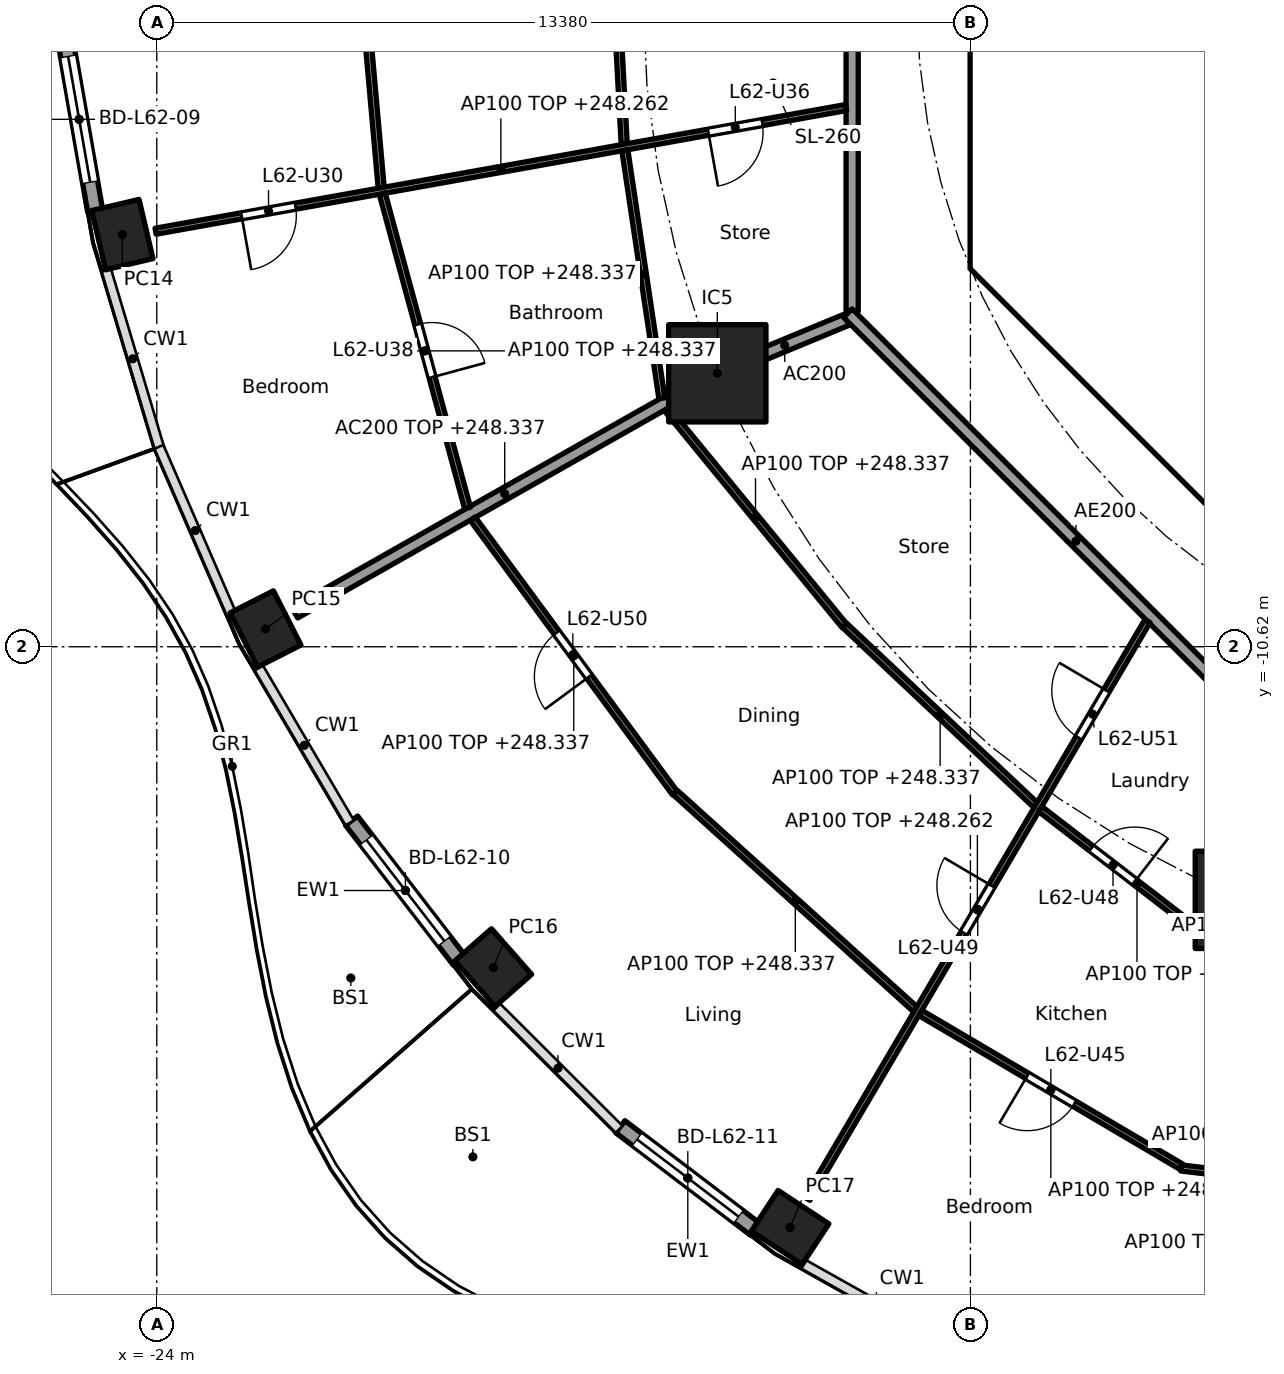
"""IFC4 building model, lengths in metres.
Left out: names, types, materials, properties, quantities, classifications, styles, units other than length and angle.
Written with IfcOpenShell. Run it as: python <this file> out.ifc"""

import sys

from ifc_helpers import new_model, si_unit, direction, frame, frame_2d, origin, origin_2d, place, context, subcontext, project, spatial, polyline, rectangle, hollow_rectangle, outline, extrude, element, fill, save


model = new_model("IFC4")
c1 = context("Model", 3, precision=1e-05, world=origin(), true_north=direction((0.0, 1.0)))
c2 = subcontext(c1, "Body", "Model", "MODEL_VIEW")
j1 = project(units=[si_unit("LENGTHUNIT", "METRE"), si_unit("PLANEANGLEUNIT", "RADIAN")], contexts=[c1])
p1 = place(None, origin())
s1 = spatial("IfcSite", under=j1, at=p1, CompositionType="ELEMENT")
p2 = place(p1, origin())
s2 = spatial("IfcBuilding", under=s1, at=p2, CompositionType="ELEMENT")
p3 = place(p2, frame((0.0, 0.0, 245.5)))
s3 = spatial("IfcBuildingStorey", under=s2, at=p3, CompositionType="ELEMENT", Elevation=245.5)
for number, where, z_axis, x_axis in (
    (1, (-24.567, -3.842, 0.0), (0.0, 0.0, 1.0), (0.229, -0.973, 0.0)),
    (2, (-22.212, -10.327, 0.0), (0.0, 0.0, 1.0), (0.452, -0.892, 0.0)),
    (3, (-18.467, -15.896, 0.0), (0.0, 0.0, 1.0), (0.66, -0.751, 0.0)),
    (4, (-13.585, -20.17, 0.0), (0.0, 0.0, 1.0), (0.836, -0.549, 0.0)),
):
    element("IfcColumn", number, at=place(p3, frame(where, z_axis=z_axis, x_axis=x_axis)), inside=s3, PredefinedType="COLUMN", context=c2, shape_type="SweptSolid", body=[
        extrude(hollow_rectangle(XDim=1.0, YDim=0.8, WallThickness=0.032, at=origin_2d()), origin(), (0.0, 0.0, 1.0), 3.7),
    ])
for number, where, z_axis, x_axis in (
    (5, (-14.782, -6.123, 0.0), (0.0, 0.0, 1.0), (1.0, 0.0, 0.0)),
    (6, (-6.123, -14.782, 0.0), (0.0, 0.0, 1.0), (1.0, 0.0, 0.0)),
):
    element("IfcColumn", number, at=place(p3, frame(where, z_axis=z_axis, x_axis=x_axis)), inside=s3, PredefinedType="COLUMN", context=c2, shape_type="SweptSolid", body=[
        extrude(rectangle(XDim=1.6, YDim=1.6, at=origin_2d()), origin(), (0.0, 0.0, 1.0), 3.7),
    ])
p4 = place(p3, frame((-25.013, -3.457, 0.0), z_axis=(0.0, 0.0, 1.0), x_axis=(-0.172241318156, 0.985054784426, 0.0)))
e7 = element("IfcWall", 7, at=p4, inside=s3, PredefinedType="SOLIDWALL", context=c2, shape_type="SweptSolid", body=[
    extrude(rectangle(XDim=3.067, YDim=0.25, at=frame_2d((1.534, 0.0))), origin(), (0.0, 0.0, 1.0), 3.44),
])
p5 = place(p4, frame((0.484, 0.0, 0.0)))
e8 = element("IfcOpeningElement", 8, at=p5, cuts=e7, PredefinedType="OPENING", context=c2, shape_type="SweptSolid", body=[
    extrude(rectangle(XDim=2.1, YDim=2.4, at=frame_2d((1.05, 1.2))), frame((0.0, 0.135, 0.0), z_axis=(0.0, -1.0, 0.0), x_axis=(1.0, 0.0, 0.0)), (0.0, 0.0, 1.0), 0.27),
])
p6 = place(p3, frame((-19.026, -15.778, 0.0), z_axis=(0.0, 0.0, 1.0), x_axis=(-0.610438565676, 0.792063607001, 0.0)))
e9 = element("IfcWall", 9, at=p6, inside=s3, PredefinedType="SOLIDWALL", context=c2, shape_type="SweptSolid", body=[
    extrude(rectangle(XDim=2.901, YDim=0.25, at=frame_2d((1.45, 0.0))), origin(), (0.0, 0.0, 1.0), 3.44),
])
p7 = place(p6, frame((0.4, 0.0, 0.0)))
e10 = element("IfcOpeningElement", 10, at=p7, cuts=e9, PredefinedType="OPENING", context=c2, shape_type="SweptSolid", body=[
    extrude(rectangle(XDim=2.1, YDim=2.4, at=frame_2d((1.05, 1.2))), frame((0.0, 0.135, 0.0), z_axis=(0.0, -1.0, 0.0), x_axis=(1.0, 0.0, 0.0)), (0.0, 0.0, 1.0), 0.27),
])
p8 = place(p3, frame((-14.157, -20.201, 0.0), z_axis=(0.0, 0.0, 1.0), x_axis=(-0.795990084031, 0.60530966135, 0.0)))
e11 = element("IfcWall", 11, at=p8, inside=s3, PredefinedType="SOLIDWALL", context=c2, shape_type="SweptSolid", body=[
    extrude(rectangle(XDim=2.789, YDim=0.25, at=frame_2d((1.394, 0.0))), origin(), (0.0, 0.0, 1.0), 3.44),
])
p9 = place(p8, frame((0.344, 0.0, 0.0)))
e12 = element("IfcOpeningElement", 12, at=p9, cuts=e11, PredefinedType="OPENING", context=c2, shape_type="SweptSolid", body=[
    extrude(rectangle(XDim=2.1, YDim=2.4, at=frame_2d((1.05, 1.2))), frame((0.0, 0.135, 0.0), z_axis=(0.0, -1.0, 0.0), x_axis=(1.0, 0.0, 0.0)), (0.0, 0.0, 1.0), 0.27),
])
p10 = place(p3, frame((-10.325, 3.801, 0.0), z_axis=(0.0, 0.0, 1.0), x_axis=(0.0, -1.0, 0.0)))
e13 = element("IfcWall", 13, at=p10, inside=s3, PredefinedType="SHEAR", context=c2, shape_type="SweptSolid", body=[
    extrude(rectangle(XDim=7.602, YDim=0.6, at=frame_2d((3.801, 0.0))), origin(), (0.0, 0.0, 1.0), 3.44),
])
p11 = place(p10, frame((0.651, 0.0, 0.0)))
e14 = element("IfcOpeningElement", 14, at=p11, cuts=e13, PredefinedType="OPENING", context=c2, shape_type="SweptSolid", body=[
    extrude(rectangle(XDim=1.5, YDim=2.1, at=frame_2d((0.75, 1.05))), frame((0.0, 0.31, 0.0), z_axis=(0.0, -1.0, 0.0), x_axis=(1.0, 0.0, 0.0)), (0.0, 0.0, 1.0), 0.62),
])
p12 = place(p10, frame((5.451, 0.0, 0.0)))
e15 = element("IfcOpeningElement", 15, at=p12, cuts=e13, PredefinedType="OPENING", context=c2, shape_type="SweptSolid", body=[
    extrude(rectangle(XDim=1.5, YDim=2.1, at=frame_2d((0.75, 1.05))), frame((0.0, 0.31, 0.0), z_axis=(0.0, -1.0, 0.0), x_axis=(1.0, 0.0, 0.0)), (0.0, 0.0, 1.0), 0.62),
])
p13 = place(p3, frame((-9.988, -4.613, 0.0), z_axis=(0.0, 0.0, 1.0), x_axis=(0.707106781187, -0.707106781187, 0.0)))
e16 = element("IfcWall", 16, at=p13, inside=s3, PredefinedType="SHEAR", context=c2, shape_type="SweptSolid", body=[
    extrude(rectangle(XDim=7.602, YDim=0.6, at=frame_2d((3.801, 0.0))), origin(), (0.0, 0.0, 1.0), 3.44),
])
p14 = place(p13, frame((6.151, 0.0, 0.0)))
e17 = element("IfcOpeningElement", 17, at=p14, cuts=e16, PredefinedType="OPENING", context=c2, shape_type="SweptSolid", body=[
    extrude(rectangle(XDim=1.1, YDim=2.1, at=frame_2d((0.55, 1.05))), frame((0.0, 0.31, 0.0), z_axis=(0.0, -1.0, 0.0), x_axis=(1.0, 0.0, 0.0)), (0.0, 0.0, 1.0), 0.62),
])
p15 = place(p3, origin())
e18 = element("IfcWall", 18, at=p15, inside=s3, PredefinedType="SHEAR", context=c2, shape_type="SweptSolid", body=[
    extrude(outline(polyline([(-10.625, -3.801), (-10.025, -3.801), (-10.025, -4.152), (-9.776, -4.401), (-10.2, -4.825), (-10.625, -4.401), (-10.625, -3.801)])), origin(), (0.0, 0.0, 1.0), 3.44),
])
p16 = place(p3, frame((-10.025, -4.0, 0.0), z_axis=(0.0, 0.0, 1.0), x_axis=(1.0, 0.0, 0.0)))
e19 = element("IfcWall", 19, at=p16, inside=s3, PredefinedType="PARTITIONING", context=c2, shape_type="SweptSolid", body=[
    extrude(rectangle(XDim=3.325, YDim=0.2, at=frame_2d((1.662, 0.0))), origin(), (0.0, 0.0, 1.0), 3.44),
])
p17 = place(p3, frame((-8.001, -6.1, 0.0), z_axis=(0.0, 0.0, 1.0), x_axis=(1.0, 0.0, 0.0)))
e20 = element("IfcWall", 20, at=p17, inside=s3, PredefinedType="PARTITIONING", context=c2, shape_type="SweptSolid", body=[
    extrude(rectangle(XDim=2.126, YDim=0.15, at=frame_2d((1.063, 0.0))), origin(), (0.0, 0.0, 1.0), 3.44),
])
p18 = place(p3, frame((-12.657, -5.243, 0.0), z_axis=(0.0, 0.0, 1.0), x_axis=(-0.923859888513, -0.38273085373, 0.0)))
e21 = element("IfcWall", 21, at=p18, inside=s3, PredefinedType="PARTITIONING", context=c2, shape_type="SweptSolid", body=[
    extrude(rectangle(XDim=2.199, YDim=0.2, at=frame_2d((1.1, 0.0))), origin(), (0.0, 0.0, 1.0), 3.44),
])
p19 = place(p3, frame((-14.825, -6.148, 0.0), z_axis=(0.0, 0.0, 1.0), x_axis=(-0.870099576105, -0.492875975944, 0.0)))
e22 = element("IfcWall", 22, at=p19, inside=s3, PredefinedType="PARTITIONING", context=c2, shape_type="SweptSolid", body=[
    extrude(rectangle(XDim=7.937, YDim=0.2, at=frame_2d((3.969, 0.0))), origin(), (0.0, 0.0, 1.0), 2.837),
])
p20 = place(p3, frame((-12.565, 5.304, 0.0), z_axis=(0.0, 0.0, 1.0), x_axis=(0.0, -1.0, 0.0)))
e23 = element("IfcWall", 23, at=p20, inside=s3, PredefinedType="PARTITIONING", context=c2, shape_type="SweptSolid", body=[
    extrude(rectangle(XDim=10.409, YDim=0.2, at=frame_2d((5.205, 0.0))), origin(), (0.0, 0.0, 1.0), 3.44),
])
p21 = place(p3, frame((-12.635, -5.134, 0.0), z_axis=(0.0, 0.0, 1.0), x_axis=(0.707106781187, -0.707106781187, 0.0)))
e24 = element("IfcWall", 24, at=p21, inside=s3, PredefinedType="PARTITIONING", context=c2, shape_type="SweptSolid", body=[
    extrude(rectangle(XDim=10.609, YDim=0.2, at=frame_2d((5.305, 0.0))), origin(), (0.0, 0.0, 1.0), 3.44),
])
p22 = place(p3, frame((-16.554, 2.1, 0.0), z_axis=(0.0, 0.0, 1.0), x_axis=(0.053945770239, -0.998543866775, 0.0)))
e25 = element("IfcWall", 25, at=p22, inside=s3, PredefinedType="PARTITIONING", context=c2, shape_type="SweptSolid", body=[
    extrude(rectangle(XDim=4.462, YDim=0.1, at=frame_2d((2.231, 0.0))), origin(), (0.0, 0.0, 1.0), 2.837),
])
p23 = place(p3, frame((-20.81, 2.542, 0.0), z_axis=(0.0, 0.0, 1.0), x_axis=(0.088621920298, -0.996065336834, 0.0)))
e26 = element("IfcWall", 26, at=p23, inside=s3, PredefinedType="PARTITIONING", context=c2, shape_type="SweptSolid", body=[
    extrude(rectangle(XDim=5.636, YDim=0.1, at=frame_2d((2.818, 0.0))), origin(), (0.0, 0.0, 1.0), 2.837),
])
p24 = place(p3, frame((-12.663, -1.752, 0.0), z_axis=(0.0, 0.0, 1.0), x_axis=(-0.98433012022, -0.176335516635, 0.0)))
e27 = element("IfcWall", 27, at=p24, inside=s3, PredefinedType="PARTITIONING", context=c2, shape_type="SweptSolid", body=[
    extrude(rectangle(XDim=11.537, YDim=0.1, at=frame_2d((5.769, 0.0))), origin(), (0.0, 0.0, 1.0), 2.762),
])
p25 = place(p24, frame((9.201, 0.0, 0.0)))
e28 = element("IfcOpeningElement", 28, at=p25, cuts=e27, PredefinedType="OPENING", context=c2, shape_type="SweptSolid", body=[
    extrude(rectangle(XDim=0.9, YDim=2.1, at=frame_2d((0.45, 1.05))), frame((0.0, 0.06, 0.0), z_axis=(0.0, -1.0, 0.0), x_axis=(1.0, 0.0, 0.0)), (0.0, 0.0, 1.0), 0.12),
])
p26 = place(p24, frame((1.403, 0.0, 0.0)))
e29 = element("IfcOpeningElement", 29, at=p26, cuts=e27, PredefinedType="OPENING", context=c2, shape_type="SweptSolid", body=[
    extrude(rectangle(XDim=0.9, YDim=2.1, at=frame_2d((0.45, 1.05))), frame((0.0, 0.06, 0.0), z_axis=(0.0, -1.0, 0.0), x_axis=(1.0, 0.0, 0.0)), (0.0, 0.0, 1.0), 0.12),
])
p27 = place(p3, frame((-16.303, -2.455, 0.0), z_axis=(0.0, 0.0, 1.0), x_axis=(0.147711951447, -0.9890304239, 0.0)))
e30 = element("IfcWall", 30, at=p27, inside=s3, PredefinedType="PARTITIONING", context=c2, shape_type="SweptSolid", body=[
    extrude(rectangle(XDim=4.122, YDim=0.1, at=frame_2d((2.061, 0.0))), origin(), (0.0, 0.0, 1.0), 2.837),
])
p28 = place(p3, frame((-20.292, -3.17, 0.0), z_axis=(0.0, 0.0, 1.0), x_axis=(0.26187906236, -0.965100697698, 0.0)))
e31 = element("IfcWall", 31, at=p28, inside=s3, PredefinedType="PARTITIONING", context=c2, shape_type="SweptSolid", body=[
    extrude(rectangle(XDim=5.356, YDim=0.1, at=frame_2d((2.678, 0.0))), origin(), (0.0, 0.0, 1.0), 2.837),
])
p29 = place(p28, frame((2.228, 0.0, 0.0)))
e32 = element("IfcOpeningElement", 32, at=p29, cuts=e31, PredefinedType="OPENING", context=c2, shape_type="SweptSolid", body=[
    extrude(rectangle(XDim=0.9, YDim=2.1, at=frame_2d((0.45, 1.05))), frame((0.0, 0.06, 0.0), z_axis=(0.0, -1.0, 0.0), x_axis=(1.0, 0.0, 0.0)), (0.0, 0.0, 1.0), 0.12),
])
p30 = place(p3, frame((-15.616, -6.708, 0.0), z_axis=(0.0, 0.0, 1.0), x_axis=(0.634076422357, -0.773270386483, 0.0)))
e33 = element("IfcWall", 33, at=p30, inside=s3, PredefinedType="PARTITIONING", context=c2, shape_type="SweptSolid", body=[
    extrude(rectangle(XDim=4.611, YDim=0.1, at=frame_2d((2.306, 0.0))), origin(), (0.0, 0.0, 1.0), 2.837),
])
p31 = place(p3, frame((-18.804, -8.516, 0.0), z_axis=(0.0, 0.0, 1.0), x_axis=(0.593249583583, -0.805018590828, 0.0)))
e34 = element("IfcWall", 34, at=p31, inside=s3, PredefinedType="PARTITIONING", context=c2, shape_type="SweptSolid", body=[
    extrude(rectangle(XDim=5.602, YDim=0.1, at=frame_2d((2.801, 0.0))), origin(), (0.0, 0.0, 1.0), 2.837),
])
p32 = place(p31, frame((2.326, 0.0, 0.0)))
e35 = element("IfcOpeningElement", 35, at=p32, cuts=e34, PredefinedType="OPENING", context=c2, shape_type="SweptSolid", body=[
    extrude(rectangle(XDim=0.9, YDim=2.1, at=frame_2d((0.45, 1.05))), frame((0.0, 0.06, 0.0), z_axis=(0.0, -1.0, 0.0), x_axis=(1.0, 0.0, 0.0)), (0.0, 0.0, 1.0), 0.12),
])
p33 = place(p3, frame((-12.688, -10.27, 0.0), z_axis=(0.0, 0.0, 1.0), x_axis=(0.728268142903, -0.685292282192, 0.0)))
e36 = element("IfcWall", 36, at=p33, inside=s3, PredefinedType="PARTITIONING", context=c2, shape_type="SweptSolid", body=[
    extrude(rectangle(XDim=4.312, YDim=0.1, at=frame_2d((2.156, 0.0))), origin(), (0.0, 0.0, 1.0), 2.837),
])
p34 = place(p3, frame((-15.474, -13.019, 0.0), z_axis=(0.0, 0.0, 1.0), x_axis=(0.742348572616, -0.670013878017, 0.0)))
e37 = element("IfcWall", 37, at=p34, inside=s3, PredefinedType="PARTITIONING", context=c2, shape_type="SweptSolid", body=[
    extrude(rectangle(XDim=5.319, YDim=0.1, at=frame_2d((2.66, 0.0))), origin(), (0.0, 0.0, 1.0), 2.837),
])
p35 = place(p3, frame((-7.709, -10.198, 0.0), z_axis=(0.0, 0.0, 1.0), x_axis=(-0.507355901053, -0.8617366127, 0.0)))
e38 = element("IfcWall", 38, at=p35, inside=s3, PredefinedType="PARTITIONING", context=c2, shape_type="SweptSolid", body=[
    extrude(rectangle(XDim=11.025, YDim=0.1, at=frame_2d((5.512, 0.0))), origin(), (0.0, 0.0, 1.0), 2.762),
])
p36 = place(p35, frame((5.05, 0.0, 0.0)))
e39 = element("IfcOpeningElement", 39, at=p36, cuts=e38, PredefinedType="OPENING", context=c2, shape_type="SweptSolid", body=[
    extrude(rectangle(XDim=0.9, YDim=2.1, at=frame_2d((0.45, 1.05))), frame((0.0, 0.06, 0.0), z_axis=(0.0, -1.0, 0.0), x_axis=(1.0, 0.0, 0.0)), (0.0, 0.0, 1.0), 0.12),
])
p37 = place(p35, frame((1.326, 0.0, 0.0)))
e40 = element("IfcOpeningElement", 40, at=p37, cuts=e38, PredefinedType="OPENING", context=c2, shape_type="SweptSolid", body=[
    extrude(rectangle(XDim=0.9, YDim=2.1, at=frame_2d((0.45, 1.05))), frame((0.0, 0.06, 0.0), z_axis=(0.0, -1.0, 0.0), x_axis=(1.0, 0.0, 0.0)), (0.0, 0.0, 1.0), 0.12),
])
p38 = place(p3, frame((-9.471, -13.289, 0.0), z_axis=(0.0, 0.0, 1.0), x_axis=(0.792207964046, -0.610251211963, 0.0)))
e41 = element("IfcWall", 41, at=p38, inside=s3, PredefinedType="PARTITIONING", context=c2, shape_type="SweptSolid", body=[
    extrude(rectangle(XDim=4.016, YDim=0.1, at=frame_2d((2.008, 0.0))), origin(), (0.0, 0.0, 1.0), 2.837),
])
p39 = place(p38, frame((1.06, 0.0, 0.0)))
e42 = element("IfcOpeningElement", 42, at=p39, cuts=e41, PredefinedType="OPENING", context=c2, shape_type="SweptSolid", body=[
    extrude(rectangle(XDim=0.9, YDim=2.1, at=frame_2d((0.45, 1.05))), frame((0.0, 0.06, 0.0), z_axis=(0.0, -1.0, 0.0), x_axis=(1.0, 0.0, 0.0)), (0.0, 0.0, 1.0), 0.12),
])
p40 = place(p3, frame((-11.445, -16.641, 0.0), z_axis=(0.0, 0.0, 1.0), x_axis=(0.861562560957, -0.507651409489, 0.0)))
e43 = element("IfcWall", 43, at=p40, inside=s3, PredefinedType="PARTITIONING", context=c2, shape_type="SweptSolid", body=[
    extrude(rectangle(XDim=4.985, YDim=0.1, at=frame_2d((2.492, 0.0))), origin(), (0.0, 0.0, 1.0), 2.837),
])
p41 = place(p40, frame((2.042, 0.0, 0.0)))
e44 = element("IfcOpeningElement", 44, at=p41, cuts=e43, PredefinedType="OPENING", context=c2, shape_type="SweptSolid", body=[
    extrude(rectangle(XDim=0.9, YDim=2.1, at=frame_2d((0.45, 1.05))), frame((0.0, 0.06, 0.0), z_axis=(0.0, -1.0, 0.0), x_axis=(1.0, 0.0, 0.0)), (0.0, 0.0, 1.0), 0.12),
])
p42 = place(p3, frame((-7.156, -19.191, 0.0), z_axis=(0.0, 0.0, 1.0), x_axis=(0.9931716165, -0.116662505458, 0.0)))
e45 = element("IfcWall", 45, at=p42, inside=s3, PredefinedType="PARTITIONING", context=c2, shape_type="SweptSolid", body=[
    extrude(rectangle(XDim=5.468, YDim=0.1, at=frame_2d((2.734, 0.0))), origin(), (0.0, 0.0, 1.0), 2.837),
])
p43 = place(p42, frame((3.626, 0.0, 0.0)))
e46 = element("IfcOpeningElement", 46, at=p43, cuts=e45, PredefinedType="OPENING", context=c2, shape_type="SweptSolid", body=[
    extrude(rectangle(XDim=0.9, YDim=2.1, at=frame_2d((0.45, 1.05))), frame((0.0, 0.06, 0.0), z_axis=(0.0, -1.0, 0.0), x_axis=(1.0, 0.0, 0.0)), (0.0, 0.0, 1.0), 0.12),
])
p44 = place(p5, origin())
e47 = element("IfcDoor", 47, at=p44, inside=s3, OperationType="SLIDING_TO_LEFT", PredefinedType="DOOR", context=c2, shape_type="SweptSolid", body=[
    extrude(rectangle(XDim=2.1, YDim=2.4, at=frame_2d((1.05, 1.2))), frame((0.0, 0.025, 0.0), z_axis=(0.0, -1.0, 0.0), x_axis=(1.0, 0.0, 0.0)), (0.0, 0.0, 1.0), 0.05),
])
fill(e8, e47)
p45 = place(p7, origin())
e48 = element("IfcDoor", 48, at=p45, inside=s3, OperationType="SLIDING_TO_LEFT", PredefinedType="DOOR", context=c2, shape_type="SweptSolid", body=[
    extrude(rectangle(XDim=2.1, YDim=2.4, at=frame_2d((1.05, 1.2))), frame((0.0, 0.025, 0.0), z_axis=(0.0, -1.0, 0.0), x_axis=(1.0, 0.0, 0.0)), (0.0, 0.0, 1.0), 0.05),
])
fill(e10, e48)
p46 = place(p9, origin())
e49 = element("IfcDoor", 49, at=p46, inside=s3, OperationType="SLIDING_TO_LEFT", PredefinedType="DOOR", context=c2, shape_type="SweptSolid", body=[
    extrude(rectangle(XDim=2.1, YDim=2.4, at=frame_2d((1.05, 1.2))), frame((0.0, 0.025, 0.0), z_axis=(0.0, -1.0, 0.0), x_axis=(1.0, 0.0, 0.0)), (0.0, 0.0, 1.0), 0.05),
])
fill(e12, e49)
p47 = place(p12, origin())
e50 = element("IfcDoor", 50, at=p47, inside=s3, OperationType="DOUBLE_DOOR_SINGLE_SWING", PredefinedType="DOOR", context=c2, shape_type="SweptSolid", body=[
    extrude(rectangle(XDim=1.5, YDim=2.1, at=frame_2d((0.75, 1.05))), frame((0.0, 0.025, 0.0), z_axis=(0.0, -1.0, 0.0), x_axis=(1.0, 0.0, 0.0)), (0.0, 0.0, 1.0), 0.05),
])
fill(e15, e50)
p48 = place(p25, origin())
e51 = element("IfcDoor", 51, at=p48, inside=s3, OperationType="SINGLE_SWING_RIGHT", PredefinedType="DOOR", context=c2, shape_type="SweptSolid", body=[
    extrude(rectangle(XDim=0.9, YDim=2.1, at=frame_2d((0.45, 1.05))), frame((0.0, 0.025, 0.0), z_axis=(0.0, -1.0, 0.0), x_axis=(1.0, 0.0, 0.0)), (0.0, 0.0, 1.0), 0.05),
])
fill(e28, e51)
p49 = place(p26, origin())
e52 = element("IfcDoor", 52, at=p49, inside=s3, OperationType="SINGLE_SWING_RIGHT", PredefinedType="DOOR", context=c2, shape_type="SweptSolid", body=[
    extrude(rectangle(XDim=0.9, YDim=2.1, at=frame_2d((0.45, 1.05))), frame((0.0, 0.025, 0.0), z_axis=(0.0, -1.0, 0.0), x_axis=(1.0, 0.0, 0.0)), (0.0, 0.0, 1.0), 0.05),
])
fill(e29, e52)
p50 = place(p29, origin())
e53 = element("IfcDoor", 53, at=p50, inside=s3, OperationType="SINGLE_SWING_RIGHT", PredefinedType="DOOR", context=c2, shape_type="SweptSolid", body=[
    extrude(rectangle(XDim=0.9, YDim=2.1, at=frame_2d((0.45, 1.05))), frame((0.0, 0.025, 0.0), z_axis=(0.0, -1.0, 0.0), x_axis=(1.0, 0.0, 0.0)), (0.0, 0.0, 1.0), 0.05),
])
fill(e32, e53)
p51 = place(p41, frame((0.9, 0.0, 0.0), x_axis=(-1.0, 0.0, 0.0)))
e54 = element("IfcDoor", 54, at=p51, inside=s3, OperationType="SINGLE_SWING_RIGHT", PredefinedType="DOOR", context=c2, shape_type="SweptSolid", body=[
    extrude(rectangle(XDim=0.9, YDim=2.1, at=frame_2d((0.45, 1.05))), frame((0.0, 0.025, 0.0), z_axis=(0.0, -1.0, 0.0), x_axis=(1.0, 0.0, 0.0)), (0.0, 0.0, 1.0), 0.05),
])
fill(e44, e54)
p52 = place(p39, origin())
e55 = element("IfcDoor", 55, at=p52, inside=s3, OperationType="SINGLE_SWING_RIGHT", PredefinedType="DOOR", context=c2, shape_type="SweptSolid", body=[
    extrude(rectangle(XDim=0.9, YDim=2.1, at=frame_2d((0.45, 1.05))), frame((0.0, 0.025, 0.0), z_axis=(0.0, -1.0, 0.0), x_axis=(1.0, 0.0, 0.0)), (0.0, 0.0, 1.0), 0.05),
])
fill(e42, e55)
p53 = place(p36, frame((0.9, 0.0, 0.0), x_axis=(-1.0, 0.0, 0.0)))
e56 = element("IfcDoor", 56, at=p53, inside=s3, OperationType="SINGLE_SWING_RIGHT", PredefinedType="DOOR", context=c2, shape_type="SweptSolid", body=[
    extrude(rectangle(XDim=0.9, YDim=2.1, at=frame_2d((0.45, 1.05))), frame((0.0, 0.025, 0.0), z_axis=(0.0, -1.0, 0.0), x_axis=(1.0, 0.0, 0.0)), (0.0, 0.0, 1.0), 0.05),
])
fill(e39, e56)
p54 = place(p32, frame((0.9, 0.0, 0.0), x_axis=(-1.0, 0.0, 0.0)))
e57 = element("IfcDoor", 57, at=p54, inside=s3, OperationType="SINGLE_SWING_LEFT", PredefinedType="DOOR", context=c2, shape_type="SweptSolid", body=[
    extrude(rectangle(XDim=0.9, YDim=2.1, at=frame_2d((0.45, 1.05))), frame((0.0, 0.025, 0.0), z_axis=(0.0, -1.0, 0.0), x_axis=(1.0, 0.0, 0.0)), (0.0, 0.0, 1.0), 0.05),
])
fill(e35, e57)
p55 = place(p37, frame((0.9, 0.0, 0.0), x_axis=(-1.0, 0.0, 0.0)))
e58 = element("IfcDoor", 58, at=p55, inside=s3, OperationType="SINGLE_SWING_RIGHT", PredefinedType="DOOR", context=c2, shape_type="SweptSolid", body=[
    extrude(rectangle(XDim=0.9, YDim=2.1, at=frame_2d((0.45, 1.05))), frame((0.0, 0.025, 0.0), z_axis=(0.0, -1.0, 0.0), x_axis=(1.0, 0.0, 0.0)), (0.0, 0.0, 1.0), 0.05),
])
fill(e40, e58)
save(model, sys.argv[1])
